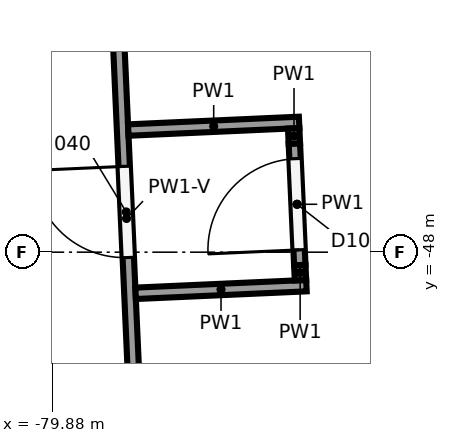
"""IFC4 building model, lengths in metres.
Left out: names, types, materials, properties, quantities, classifications, styles, units other than length and angle.
Written with IfcOpenShell. Run it as: python <this file> out.ifc"""

import sys

from ifc_helpers import new_model, si_unit, direction, frame, frame_2d, origin, place, context, subcontext, project, spatial, rectangle, extrude, element, fill, save


model = new_model("IFC4")
c1 = context("Model", 3, precision=1e-05, world=origin(), true_north=direction((0.0, 1.0)))
c2 = subcontext(c1, "Body", "Model", "MODEL_VIEW")
j1 = project(units=[si_unit("LENGTHUNIT", "METRE"), si_unit("PLANEANGLEUNIT", "RADIAN")], contexts=[c1])
p1 = place(None, origin())
s1 = spatial("IfcSite", under=j1, at=p1, CompositionType="ELEMENT")
p2 = place(p1, origin())
s2 = spatial("IfcBuilding", under=s1, at=p2, CompositionType="ELEMENT")
p3 = place(p2, frame((0.0, 0.0, 12.0)))
s3 = spatial("IfcBuildingStorey", under=s2, at=p3, CompositionType="ELEMENT", Elevation=12.0)
p4 = place(p3, frame((-78.691, -52.266, 0.0), z_axis=(0.0, 0.0, 1.0), x_axis=(-0.044749816806, 0.998998225172, 0.0)))
e1 = element("IfcWall", 1, at=p4, inside=s3, PredefinedType="PARTITIONING", context=c2, shape_type="SweptSolid", body=[
    extrude(rectangle(XDim=9.427, YDim=0.15, at=frame_2d((4.714, 0.0))), origin(), (0.0, 0.0, 1.0), 3.962),
])
p5 = place(p4, frame((4.2, 0.0, 0.0)))
e2 = element("IfcOpeningElement", 2, at=p5, cuts=e1, PredefinedType="OPENING", context=c2, shape_type="SweptSolid", body=[
    extrude(rectangle(XDim=1.2, YDim=2.1, at=frame_2d((0.6, 1.05))), frame((0.0, 0.085, 0.0), z_axis=(0.0, -1.0, 0.0), x_axis=(1.0, 0.0, 0.0)), (0.0, 0.0, 1.0), 0.17),
])
for number, where, z_axis, x_axis in (
    (3, (-78.783, -48.541, 0.0), (0.0, 0.0, 1.0), (0.999, 0.045, 0.0)),
    (4, (-78.879, -46.393, 0.0), (0.0, 0.0, 1.0), (0.999, 0.045, 0.0)),
):
    element("IfcWall", number, at=place(p3, frame(where, z_axis=z_axis, x_axis=x_axis)), inside=s3, PredefinedType="PARTITIONING", context=c2, shape_type="SweptSolid", body=[
        extrude(rectangle(XDim=2.25, YDim=0.15, at=frame_2d((1.125, 0.0))), origin(), (0.0, 0.0, 1.0), 5.65),
    ])
p6 = place(p3, frame((-76.614, -48.369, 0.0), z_axis=(0.0, 0.0, 1.0), x_axis=(-0.04518607304, 0.99897858776, 0.0)))
e5 = element("IfcWall", 5, at=p6, inside=s3, PredefinedType="PARTITIONING", context=c2, shape_type="SweptSolid", body=[
    extrude(rectangle(XDim=0.2, YDim=0.15, at=frame_2d((0.1, 0.0))), origin(), (0.0, 0.0, 1.0), 5.65),
])
p7 = place(p3, frame((-76.623, -48.169, 0.0), z_axis=(0.0, 0.0, 1.0), x_axis=(-0.044708572026, 0.999000071866, 0.0)))
e6 = element("IfcWall", 6, at=p7, inside=s3, PredefinedType="PARTITIONING", context=c2, shape_type="SweptSolid", body=[
    extrude(rectangle(XDim=1.6, YDim=0.15, at=frame_2d((0.8, 0.0))), origin(), (0.0, 0.0, 1.0), 5.65),
])
p8 = place(p7, frame((0.2, 0.0, 0.0)))
e7 = element("IfcOpeningElement", 7, at=p8, cuts=e6, PredefinedType="OPENING", context=c2, shape_type="SweptSolid", body=[
    extrude(rectangle(XDim=1.2, YDim=2.1, at=frame_2d((0.6, 1.05))), frame((0.0, 0.085, 0.0), z_axis=(0.0, -1.0, 0.0), x_axis=(1.0, 0.0, 0.0)), (0.0, 0.0, 1.0), 0.17),
])
p9 = place(p3, frame((-76.694, -46.571, 0.0), z_axis=(0.0, 0.0, 1.0), x_axis=(-0.043913640913, 0.999035330778, 0.0)))
e8 = element("IfcWall", 8, at=p9, inside=s3, PredefinedType="PARTITIONING", context=c2, shape_type="SweptSolid", body=[
    extrude(rectangle(XDim=0.2, YDim=0.15, at=frame_2d((0.1, 0.0))), origin(), (0.0, 0.0, 1.0), 5.65),
])
p10 = place(p5, origin())
e9 = element("IfcDoor", 9, at=p10, inside=s3, OperationType="SINGLE_SWING_RIGHT", PredefinedType="DOOR", context=c2, shape_type="SweptSolid", body=[
    extrude(rectangle(XDim=1.2, YDim=2.1, at=frame_2d((0.6, 1.05))), frame((0.0, 0.025, 0.0), z_axis=(0.0, -1.0, 0.0), x_axis=(1.0, 0.0, 0.0)), (0.0, 0.0, 1.0), 0.05),
])
fill(e2, e9)
p11 = place(p8, origin())
e10 = element("IfcDoor", 10, at=p11, inside=s3, OperationType="SINGLE_SWING_LEFT", PredefinedType="DOOR", context=c2, shape_type="SweptSolid", body=[
    extrude(rectangle(XDim=1.2, YDim=2.1, at=frame_2d((0.6, 1.05))), frame((0.0, 0.025, 0.0), z_axis=(0.0, -1.0, 0.0), x_axis=(1.0, 0.0, 0.0)), (0.0, 0.0, 1.0), 0.05),
])
fill(e7, e10)
save(model, sys.argv[1])
